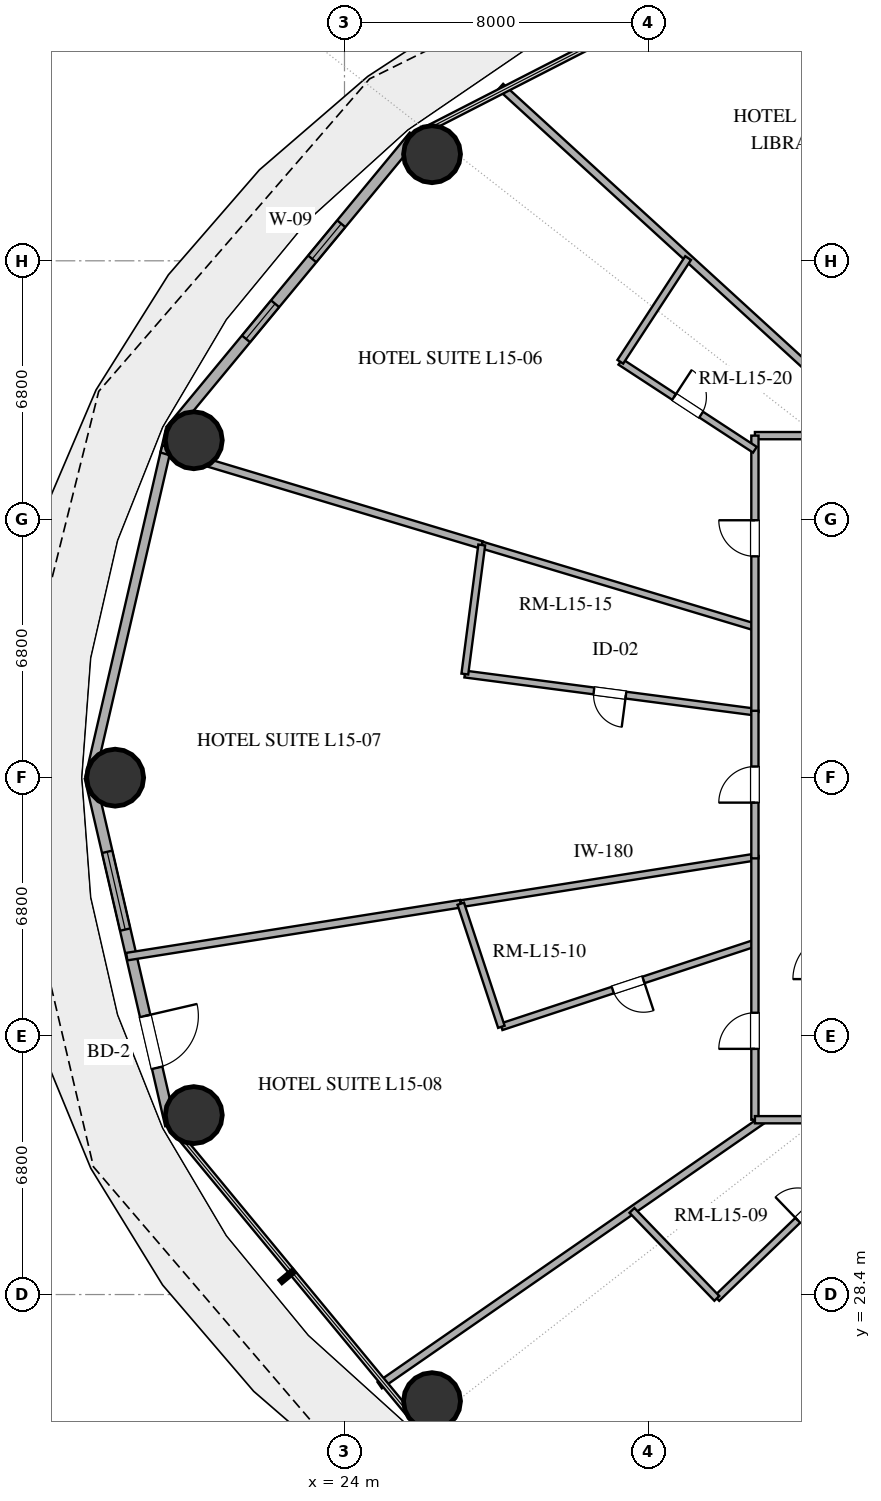
"""IFC4 building model, lengths in metres.
Left out: names, types, materials, properties, quantities, classifications, styles, units other than length and angle.
Written with IfcOpenShell. Run it as: python <this file> out.ifc"""

import sys

from ifc_helpers import new_model, si_unit, direction, frame, frame_2d, origin, origin_2d, place, context, subcontext, project, spatial, rectangle, hollow_circle, extrude, element, fill, save


model = new_model("IFC4")
c1 = context("Model", 3, precision=1e-05, world=origin(), true_north=direction((0.0, 1.0)))
c2 = subcontext(c1, "Body", "Model", "MODEL_VIEW")
j1 = project(units=[si_unit("LENGTHUNIT", "METRE"), si_unit("PLANEANGLEUNIT", "RADIAN")], contexts=[c1])
p1 = place(None, origin())
s1 = spatial("IfcSite", under=j1, at=p1, CompositionType="ELEMENT")
p2 = place(p1, origin())
s2 = spatial("IfcBuilding", under=s1, at=p2, CompositionType="ELEMENT")
p3 = place(p2, frame((0.0, 0.0, 64.2)))
s3 = spatial("IfcBuildingStorey", under=s2, at=p3, CompositionType="ELEMENT", Elevation=64.2)
for number, where, z_axis, x_axis in (
    (1, (26.303, 58.405, 0.0), (0.0, 0.0, 1.0), (1.0, 0.0, 0.0)),
    (2, (20.034, 50.878, 0.0), (0.0, 0.0, 1.0), (1.0, 0.0, 0.0)),
    (3, (17.965, 42.0, 0.0), (0.0, 0.0, 1.0), (1.0, 0.0, 0.0)),
    (4, (20.034, 33.122, 0.0), (0.0, 0.0, 1.0), (1.0, 0.0, 0.0)),
    (5, (26.303, 25.595, 0.0), (0.0, 0.0, 1.0), (1.0, 0.0, 0.0)),
):
    element("IfcColumn", number, at=place(p3, frame(where, z_axis=z_axis, x_axis=x_axis)), inside=s3, PredefinedType="COLUMN", context=c2, shape_type="SweptSolid", body=[
        extrude(hollow_circle(Radius=0.75, WallThickness=0.04, at=origin_2d()), origin(), (0.0, 0.0, 1.0), 3.38),
    ])
p4 = place(p3, frame((25.826, 58.886, 0.0), z_axis=(0.0, 0.0, 1.0), x_axis=(-0.637296809613, -0.770618437657, 0.0)))
e6 = element("IfcWall", 6, at=p4, inside=s3, PredefinedType="SOLIDWALL", context=c2, shape_type="SweptSolid", body=[
    extrude(rectangle(XDim=10.053, YDim=0.28, at=frame_2d((5.027, 0.0))), origin(), (0.0, 0.0, 1.0), 3.38),
])
p5 = place(p4, frame((2.998, 0.0, 0.85)))
e7 = element("IfcOpeningElement", 7, at=p5, cuts=e6, PredefinedType="OPENING", context=c2, shape_type="SweptSolid", body=[
    extrude(rectangle(XDim=1.2, YDim=1.8, at=frame_2d((0.6, 0.9))), frame((0.0, 0.15, 0.0), z_axis=(0.0, -1.0, 0.0), x_axis=(1.0, 0.0, 0.0)), (0.0, 0.0, 1.0), 0.3),
])
p6 = place(p4, frame((5.73, 0.0, 0.85)))
e8 = element("IfcOpeningElement", 8, at=p6, cuts=e6, PredefinedType="OPENING", context=c2, shape_type="SweptSolid", body=[
    extrude(rectangle(XDim=1.2, YDim=1.8, at=frame_2d((0.6, 0.9))), frame((0.0, 0.15, 0.0), z_axis=(0.0, -1.0, 0.0), x_axis=(1.0, 0.0, 0.0)), (0.0, 0.0, 1.0), 0.3),
])
p7 = place(p3, frame((19.419, 51.138, 0.0), z_axis=(0.0, 0.0, 1.0), x_axis=(-0.225454452941, -0.974253709076, 0.0)))
e9 = element("IfcWall", 9, at=p7, inside=s3, PredefinedType="SOLIDWALL", context=c2, shape_type="SweptSolid", body=[
    extrude(rectangle(XDim=9.38, YDim=0.25, at=frame_2d((4.69, 0.0))), origin(), (0.0, 0.0, 1.0), 3.38),
])
p8 = place(p3, frame((17.304, 42.0, 0.0), z_axis=(0.0, 0.0, 1.0), x_axis=(0.225454452941, -0.974253709076, 0.0)))
e10 = element("IfcWall", 10, at=p8, inside=s3, PredefinedType="SOLIDWALL", context=c2, shape_type="SweptSolid", body=[
    extrude(rectangle(XDim=9.38, YDim=0.28, at=frame_2d((4.69, 0.0))), origin(), (0.0, 0.0, 1.0), 3.38),
])
p9 = place(p8, frame((2.002, 0.0, 0.85)))
e11 = element("IfcOpeningElement", 11, at=p9, cuts=e10, PredefinedType="OPENING", context=c2, shape_type="SweptSolid", body=[
    extrude(rectangle(XDim=2.1, YDim=2.2, at=frame_2d((1.05, 1.1))), frame((0.0, 0.15, 0.0), z_axis=(0.0, -1.0, 0.0), x_axis=(1.0, 0.0, 0.0)), (0.0, 0.0, 1.0), 0.3),
])
p10 = place(p8, frame((6.435, 0.0, 0.0)))
e12 = element("IfcOpeningElement", 12, at=p10, cuts=e10, PredefinedType="OPENING", context=c2, shape_type="SweptSolid", body=[
    extrude(rectangle(XDim=1.4, YDim=2.2, at=frame_2d((0.7, 1.1))), frame((0.0, 0.15, 0.0), z_axis=(0.0, -1.0, 0.0), x_axis=(1.0, 0.0, 0.0)), (0.0, 0.0, 1.0), 0.3),
])
p11 = place(p3, frame((25.826, 25.114, 0.0), z_axis=(0.0, 0.0, 1.0), x_axis=(0.889853976658, -0.456245438581, 0.0)))
e13 = element("IfcWall", 13, at=p11, inside=s3, PredefinedType="SOLIDWALL", context=c2, shape_type="SweptSolid", body=[
    extrude(rectangle(XDim=11.346, YDim=0.28, at=frame_2d((5.673, 0.0))), origin(), (0.0, 0.0, 1.0), 3.38),
])
p12 = place(p11, frame((3.267, 0.0, 0.85)))
e14 = element("IfcOpeningElement", 14, at=p12, cuts=e13, PredefinedType="OPENING", context=c2, shape_type="SweptSolid", body=[
    extrude(rectangle(XDim=1.65, YDim=2.0, at=frame_2d((0.825, 1.0))), frame((0.0, 0.15, 0.0), z_axis=(0.0, -1.0, 0.0), x_axis=(1.0, 0.0, 0.0)), (0.0, 0.0, 1.0), 0.3),
])
p13 = place(p11, frame((6.579, 0.0, 0.85)))
e15 = element("IfcOpeningElement", 15, at=p13, cuts=e13, PredefinedType="OPENING", context=c2, shape_type="SweptSolid", body=[
    extrude(rectangle(XDim=1.65, YDim=2.0, at=frame_2d((0.825, 1.0))), frame((0.0, 0.15, 0.0), z_axis=(0.0, -1.0, 0.0), x_axis=(1.0, 0.0, 0.0)), (0.0, 0.0, 1.0), 0.3),
])
p14 = place(p3, frame((42.893, 33.0, 0.0), z_axis=(0.0, 0.0, 1.0), x_axis=(-0.493512300658, -0.869738816599, 0.0)))
e16 = element("IfcWall", 16, at=p14, inside=s3, PredefinedType="PARTITIONING", context=c2, shape_type="SweptSolid", body=[
    extrude(rectangle(XDim=14.938, YDim=0.2, at=frame_2d((7.469, 0.0))), origin(), (0.0, 0.0, 1.0), 2.74),
])
p15 = place(p3, frame((18.271, 37.292, 0.0), z_axis=(0.0, 0.0, 1.0), x_axis=(0.987691229297, 0.156416225401, 0.0)))
e17 = element("IfcWall", 17, at=p15, inside=s3, PredefinedType="PARTITIONING", context=c2, shape_type="SweptSolid", body=[
    extrude(rectangle(XDim=8.898, YDim=0.2, at=frame_2d((4.449, 0.0))), origin(), (0.0, 0.0, 1.0), 2.74),
])
p16 = place(p3, frame((19.184, 50.653, 0.0), z_axis=(0.0, 0.0, 1.0), x_axis=(0.957749889613, -0.287602414708, 0.0)))
e18 = element("IfcWall", 18, at=p16, inside=s3, PredefinedType="PARTITIONING", context=c2, shape_type="SweptSolid", body=[
    extrude(rectangle(XDim=8.8, YDim=0.2, at=frame_2d((4.4, 0.0))), origin(), (0.0, 0.0, 1.0), 2.74),
])
p17 = place(p3, frame((35.009, 33.0, 0.0), z_axis=(0.0, 0.0, 1.0), x_axis=(-0.821999402566, -0.569488351226, 0.0)))
e19 = element("IfcWall", 19, at=p17, inside=s3, PredefinedType="PARTITIONING", context=c2, shape_type="SweptSolid", body=[
    extrude(rectangle(XDim=12.266, YDim=0.2, at=frame_2d((6.133, 0.0))), origin(), (0.0, 0.0, 1.0), 2.74),
])
p18 = place(p3, frame((27.06, 38.683, 0.0), z_axis=(0.0, 0.0, 1.0), x_axis=(0.987690363599, 0.156421691762, 0.0)))
e20 = element("IfcWall", 20, at=p18, inside=s3, PredefinedType="PLUMBINGWALL", context=c2, shape_type="SweptSolid", body=[
    extrude(rectangle(XDim=7.837, YDim=0.18, at=frame_2d((3.918, 0.0))), origin(), (0.0, 0.0, 1.0), 2.74),
])
p19 = place(p3, frame((34.8, 43.728, 0.0), z_axis=(0.0, 0.0, 1.0), x_axis=(-0.991543548491, 0.129774386708, 0.0)))
e21 = element("IfcWall", 21, at=p19, inside=s3, PredefinedType="PLUMBINGWALL", context=c2, shape_type="SweptSolid", body=[
    extrude(rectangle(XDim=7.698, YDim=0.18, at=frame_2d((3.849, 0.0))), origin(), (0.0, 0.0, 1.0), 2.74),
])
p20 = place(p19, frame((3.424, 0.0, 0.0)))
e22 = element("IfcOpeningElement", 22, at=p20, cuts=e21, PredefinedType="OPENING", context=c2, shape_type="SweptSolid", body=[
    extrude(rectangle(XDim=0.85, YDim=2.1, at=frame_2d((0.425, 1.05))), frame((0.0, 0.1, 0.0), z_axis=(0.0, -1.0, 0.0), x_axis=(1.0, 0.0, 0.0)), (0.0, 0.0, 1.0), 0.2),
])
p21 = place(p3, frame((27.612, 48.122, 0.0), z_axis=(0.0, 0.0, 1.0), x_axis=(0.95775642604, -0.28758064674, 0.0)))
e23 = element("IfcWall", 23, at=p21, inside=s3, PredefinedType="PLUMBINGWALL", context=c2, shape_type="SweptSolid", body=[
    extrude(rectangle(XDim=7.506, YDim=0.18, at=frame_2d((3.753, 0.0))), origin(), (0.0, 0.0, 1.0), 2.74),
])
p22 = place(p3, frame((34.8, 37.646, 0.0), z_axis=(0.0, 0.0, 1.0), x_axis=(-0.949662150081, -0.313275917849, 0.0)))
e24 = element("IfcWall", 24, at=p22, inside=s3, PredefinedType="PLUMBINGWALL", context=c2, shape_type="SweptSolid", body=[
    extrude(rectangle(XDim=7.026, YDim=0.18, at=frame_2d((3.513, 0.0))), origin(), (0.0, 0.0, 1.0), 2.74),
])
p23 = place(p22, frame((3.088, 0.0, 0.0)))
e25 = element("IfcOpeningElement", 25, at=p23, cuts=e24, PredefinedType="OPENING", context=c2, shape_type="SweptSolid", body=[
    extrude(rectangle(XDim=0.85, YDim=2.1, at=frame_2d((0.425, 1.05))), frame((0.0, 0.1, 0.0), z_axis=(0.0, -1.0, 0.0), x_axis=(1.0, 0.0, 0.0)), (0.0, 0.0, 1.0), 0.2),
])
p24 = place(p3, frame((38.154, 51.0, 0.0), z_axis=(0.0, 0.0, 1.0), x_axis=(-0.738119160364, 0.674670367738, 0.0)))
e26 = element("IfcWall", 26, at=p24, inside=s3, PredefinedType="PARTITIONING", context=c2, shape_type="SweptSolid", body=[
    extrude(rectangle(XDim=13.61, YDim=0.2, at=frame_2d((6.805, 0.0))), origin(), (0.0, 0.0, 1.0), 2.74),
])
p25 = place(p3, frame((33.798, 28.299, 0.0), z_axis=(0.0, 0.0, 1.0), x_axis=(0.719667322044, 0.69431905172, 0.0)))
e27 = element("IfcWall", 27, at=p25, inside=s3, PredefinedType="PLUMBINGWALL", context=c2, shape_type="SweptSolid", body=[
    extrude(rectangle(XDim=6.771, YDim=0.18, at=frame_2d((3.385, 0.0))), origin(), (0.0, 0.0, 1.0), 2.74),
])
p26 = place(p25, frame((2.96, 0.0, 0.0)))
e28 = element("IfcOpeningElement", 28, at=p26, cuts=e27, PredefinedType="OPENING", context=c2, shape_type="SweptSolid", body=[
    extrude(rectangle(XDim=0.85, YDim=2.1, at=frame_2d((0.425, 1.05))), frame((0.0, 0.1, 0.0), z_axis=(0.0, -1.0, 0.0), x_axis=(1.0, 0.0, 0.0)), (0.0, 0.0, 1.0), 0.2),
])
p27 = place(p3, frame((34.8, 51.0, 0.0), z_axis=(0.0, 0.0, 1.0), x_axis=(1.0, 0.0, 0.0)))
e29 = element("IfcWall", 29, at=p27, inside=s3, PredefinedType="PARTITIONING", context=c2, shape_type="SweptSolid", body=[
    extrude(rectangle(XDim=13.839, YDim=0.19, at=frame_2d((6.919, 0.0))), origin(), (0.0, 0.0, 1.0), 2.74),
])
p28 = place(p27, frame((5.965, 0.0, 0.0)))
e30 = element("IfcOpeningElement", 30, at=p28, cuts=e29, PredefinedType="OPENING", context=c2, shape_type="SweptSolid", body=[
    extrude(rectangle(XDim=1.0, YDim=2.2, at=frame_2d((0.5, 1.1))), frame((0.0, 0.105, 0.0), z_axis=(0.0, -1.0, 0.0), x_axis=(1.0, 0.0, 0.0)), (0.0, 0.0, 1.0), 0.21),
])
p29 = place(p27, frame((10.493, 0.0, 0.0)))
e31 = element("IfcOpeningElement", 31, at=p29, cuts=e29, PredefinedType="OPENING", context=c2, shape_type="SweptSolid", body=[
    extrude(rectangle(XDim=0.95, YDim=2.15, at=frame_2d((0.475, 1.075))), frame((0.0, 0.105, 0.0), z_axis=(0.0, -1.0, 0.0), x_axis=(1.0, 0.0, 0.0)), (0.0, 0.0, 1.0), 0.21),
])
p30 = place(p3, frame((34.8, 43.728, 0.0), z_axis=(0.0, 0.0, 1.0), x_axis=(0.0, 1.0, 0.0)))
e32 = element("IfcWall", 32, at=p30, inside=s3, PredefinedType="PARTITIONING", context=c2, shape_type="SweptSolid", body=[
    extrude(rectangle(XDim=7.272, YDim=0.19, at=frame_2d((3.636, 0.0))), origin(), (0.0, 0.0, 1.0), 2.74),
])
p31 = place(p30, frame((4.096, 0.0, 0.0)))
e33 = element("IfcOpeningElement", 33, at=p31, cuts=e32, PredefinedType="OPENING", context=c2, shape_type="SweptSolid", body=[
    extrude(rectangle(XDim=0.95, YDim=2.15, at=frame_2d((0.475, 1.075))), frame((0.0, 0.105, 0.0), z_axis=(0.0, -1.0, 0.0), x_axis=(1.0, 0.0, 0.0)), (0.0, 0.0, 1.0), 0.21),
])
p32 = place(p3, frame((34.8, 33.0, 0.0), z_axis=(0.0, 0.0, 1.0), x_axis=(0.0, 1.0, 0.0)))
e34 = element("IfcWall", 34, at=p32, inside=s3, PredefinedType="PARTITIONING", context=c2, shape_type="SweptSolid", body=[
    extrude(rectangle(XDim=6.942, YDim=0.19, at=frame_2d((3.471, 0.0))), origin(), (0.0, 0.0, 1.0), 2.74),
])
p33 = place(p32, frame((1.865, 0.0, 0.0)))
e35 = element("IfcOpeningElement", 35, at=p33, cuts=e34, PredefinedType="OPENING", context=c2, shape_type="SweptSolid", body=[
    extrude(rectangle(XDim=0.95, YDim=2.15, at=frame_2d((0.475, 1.075))), frame((0.0, 0.105, 0.0), z_axis=(0.0, -1.0, 0.0), x_axis=(1.0, 0.0, 0.0)), (0.0, 0.0, 1.0), 0.21),
])
p34 = place(p3, frame((47.425, 33.0, 0.0), z_axis=(0.0, 0.0, 1.0), x_axis=(-1.0, 0.0, 0.0)))
e36 = element("IfcWall", 36, at=p34, inside=s3, PredefinedType="PARTITIONING", context=c2, shape_type="SweptSolid", body=[
    extrude(rectangle(XDim=12.625, YDim=0.19, at=frame_2d((6.312, 0.0))), origin(), (0.0, 0.0, 1.0), 2.74),
])
p35 = place(p34, frame((1.784, 0.0, 0.0)))
e37 = element("IfcOpeningElement", 37, at=p35, cuts=e36, PredefinedType="OPENING", context=c2, shape_type="SweptSolid", body=[
    extrude(rectangle(XDim=1.0, YDim=2.2, at=frame_2d((0.5, 1.1))), frame((0.0, 0.105, 0.0), z_axis=(0.0, -1.0, 0.0), x_axis=(1.0, 0.0, 0.0)), (0.0, 0.0, 1.0), 0.21),
])
p36 = place(p34, frame((6.173, 0.0, 0.0)))
e38 = element("IfcOpeningElement", 38, at=p36, cuts=e36, PredefinedType="OPENING", context=c2, shape_type="SweptSolid", body=[
    extrude(rectangle(XDim=0.95, YDim=2.15, at=frame_2d((0.475, 1.075))), frame((0.0, 0.105, 0.0), z_axis=(0.0, -1.0, 0.0), x_axis=(1.0, 0.0, 0.0)), (0.0, 0.0, 1.0), 0.21),
])
p37 = place(p3, frame((31.258, 52.944, 0.0), z_axis=(0.0, 0.0, 1.0), x_axis=(0.837031612028, -0.5471545307, 0.0)))
e39 = element("IfcWall", 39, at=p37, inside=s3, PredefinedType="PLUMBINGWALL", context=c2, shape_type="SweptSolid", body=[
    extrude(rectangle(XDim=4.231, YDim=0.18, at=frame_2d((2.116, 0.0))), origin(), (0.0, 0.0, 1.0), 2.74),
])
p38 = place(p37, frame((1.691, 0.0, 0.0)))
e40 = element("IfcOpeningElement", 40, at=p38, cuts=e39, PredefinedType="OPENING", context=c2, shape_type="SweptSolid", body=[
    extrude(rectangle(XDim=0.85, YDim=2.1, at=frame_2d((0.425, 1.05))), frame((0.0, 0.1, 0.0), z_axis=(0.0, -1.0, 0.0), x_axis=(1.0, 0.0, 0.0)), (0.0, 0.0, 1.0), 0.2),
])
p39 = place(p3, frame((34.8, 39.877, 0.0), z_axis=(0.0, 0.0, 1.0), x_axis=(0.0, 1.0, 0.0)))
e41 = element("IfcWall", 41, at=p39, inside=s3, PredefinedType="PARTITIONING", context=c2, shape_type="SweptSolid", body=[
    extrude(rectangle(XDim=3.883, YDim=0.19, at=frame_2d((1.941, 0.0))), origin(), (0.0, 0.0, 1.0), 2.74),
])
p40 = place(p39, frame((1.467, 0.0, 0.0)))
e42 = element("IfcOpeningElement", 42, at=p40, cuts=e41, PredefinedType="OPENING", context=c2, shape_type="SweptSolid", body=[
    extrude(rectangle(XDim=0.95, YDim=2.15, at=frame_2d((0.475, 1.075))), frame((0.0, 0.105, 0.0), z_axis=(0.0, -1.0, 0.0), x_axis=(1.0, 0.0, 0.0)), (0.0, 0.0, 1.0), 0.21),
])
p41 = place(p3, frame((27.167, 44.727, 0.0), z_axis=(0.0, 0.0, 1.0), x_axis=(0.129823772588, 0.991537083558, 0.0)))
e43 = element("IfcWall", 43, at=p41, inside=s3, PredefinedType="PLUMBINGWALL", context=c2, shape_type="SweptSolid", body=[
    extrude(rectangle(XDim=3.425, YDim=0.18, at=frame_2d((1.712, 0.0))), origin(), (0.0, 0.0, 1.0), 2.74),
])
p42 = place(p3, frame((28.128, 35.445, 0.0), z_axis=(0.0, 0.0, 1.0), x_axis=(-0.313262541659, 0.949666562533, 0.0)))
e44 = element("IfcWall", 44, at=p42, inside=s3, PredefinedType="PLUMBINGWALL", context=c2, shape_type="SweptSolid", body=[
    extrude(rectangle(XDim=3.41, YDim=0.18, at=frame_2d((1.705, 0.0))), origin(), (0.0, 0.0, 1.0), 2.74),
])
p43 = place(p3, frame((33.042, 55.672, 0.0), z_axis=(0.0, 0.0, 1.0), x_axis=(-0.547176717469, -0.837017108463, 0.0)))
e45 = element("IfcWall", 45, at=p43, inside=s3, PredefinedType="PLUMBINGWALL", context=c2, shape_type="SweptSolid", body=[
    extrude(rectangle(XDim=3.26, YDim=0.18, at=frame_2d((1.63, 0.0))), origin(), (0.0, 0.0, 1.0), 2.74),
])
p44 = place(p3, frame((31.565, 30.614, 0.0), z_axis=(0.0, 0.0, 1.0), x_axis=(0.694278833189, -0.719706121821, 0.0)))
e46 = element("IfcWall", 46, at=p44, inside=s3, PredefinedType="PLUMBINGWALL", context=c2, shape_type="SweptSolid", body=[
    extrude(rectangle(XDim=3.217, YDim=0.18, at=frame_2d((1.608, 0.0))), origin(), (0.0, 0.0, 1.0), 2.74),
])
p45 = place(p5, origin())
e47 = element("IfcWindow", 47, at=p45, inside=s3, PartitioningType="SINGLE_PANEL", PredefinedType="WINDOW", context=c2, shape_type="SweptSolid", body=[
    extrude(rectangle(XDim=1.2, YDim=1.8, at=frame_2d((0.6, 0.9))), frame((0.0, 0.03, 0.0), z_axis=(0.0, -1.0, 0.0), x_axis=(1.0, 0.0, 0.0)), (0.0, 0.0, 1.0), 0.06),
])
fill(e7, e47)
p46 = place(p6, origin())
e48 = element("IfcWindow", 48, at=p46, inside=s3, PartitioningType="SINGLE_PANEL", PredefinedType="WINDOW", context=c2, shape_type="SweptSolid", body=[
    extrude(rectangle(XDim=1.2, YDim=1.8, at=frame_2d((0.6, 0.9))), frame((0.0, 0.03, 0.0), z_axis=(0.0, -1.0, 0.0), x_axis=(1.0, 0.0, 0.0)), (0.0, 0.0, 1.0), 0.06),
])
fill(e8, e48)
p47 = place(p9, origin())
e49 = element("IfcWindow", 49, at=p47, inside=s3, PartitioningType="SINGLE_PANEL", PredefinedType="WINDOW", context=c2, shape_type="SweptSolid", body=[
    extrude(rectangle(XDim=2.1, YDim=2.2, at=frame_2d((1.05, 1.1))), frame((0.0, 0.03, 0.0), z_axis=(0.0, -1.0, 0.0), x_axis=(1.0, 0.0, 0.0)), (0.0, 0.0, 1.0), 0.06),
])
fill(e11, e49)
p48 = place(p10, origin())
e50 = element("IfcDoor", 50, at=p48, inside=s3, OperationType="SINGLE_SWING_LEFT", PredefinedType="DOOR", context=c2, shape_type="SweptSolid", body=[
    extrude(rectangle(XDim=1.4, YDim=2.2, at=frame_2d((0.7, 1.1))), frame((0.0, 0.025, 0.0), z_axis=(0.0, -1.0, 0.0), x_axis=(1.0, 0.0, 0.0)), (0.0, 0.0, 1.0), 0.05),
])
fill(e12, e50)
p49 = place(p20, origin())
e51 = element("IfcDoor", 51, at=p49, inside=s3, OperationType="SINGLE_SWING_LEFT", PredefinedType="DOOR", context=c2, shape_type="SweptSolid", body=[
    extrude(rectangle(XDim=0.85, YDim=2.1, at=frame_2d((0.425, 1.05))), frame((0.0, 0.025, 0.0), z_axis=(0.0, -1.0, 0.0), x_axis=(1.0, 0.0, 0.0)), (0.0, 0.0, 1.0), 0.05),
])
fill(e22, e51)
p50 = place(p23, origin())
e52 = element("IfcDoor", 52, at=p50, inside=s3, OperationType="SINGLE_SWING_LEFT", PredefinedType="DOOR", context=c2, shape_type="SweptSolid", body=[
    extrude(rectangle(XDim=0.85, YDim=2.1, at=frame_2d((0.425, 1.05))), frame((0.0, 0.025, 0.0), z_axis=(0.0, -1.0, 0.0), x_axis=(1.0, 0.0, 0.0)), (0.0, 0.0, 1.0), 0.05),
])
fill(e25, e52)
p51 = place(p26, origin())
e53 = element("IfcDoor", 53, at=p51, inside=s3, OperationType="SINGLE_SWING_LEFT", PredefinedType="DOOR", context=c2, shape_type="SweptSolid", body=[
    extrude(rectangle(XDim=0.85, YDim=2.1, at=frame_2d((0.425, 1.05))), frame((0.0, 0.025, 0.0), z_axis=(0.0, -1.0, 0.0), x_axis=(1.0, 0.0, 0.0)), (0.0, 0.0, 1.0), 0.05),
])
fill(e28, e53)
p52 = place(p31, origin())
e54 = element("IfcDoor", 54, at=p52, inside=s3, OperationType="SINGLE_SWING_RIGHT", PredefinedType="DOOR", context=c2, shape_type="SweptSolid", body=[
    extrude(rectangle(XDim=0.95, YDim=2.15, at=frame_2d((0.475, 1.075))), frame((0.0, 0.025, 0.0), z_axis=(0.0, -1.0, 0.0), x_axis=(1.0, 0.0, 0.0)), (0.0, 0.0, 1.0), 0.05),
])
fill(e33, e54)
p53 = place(p33, origin())
e55 = element("IfcDoor", 55, at=p53, inside=s3, OperationType="SINGLE_SWING_LEFT", PredefinedType="DOOR", context=c2, shape_type="SweptSolid", body=[
    extrude(rectangle(XDim=0.95, YDim=2.15, at=frame_2d((0.475, 1.075))), frame((0.0, 0.025, 0.0), z_axis=(0.0, -1.0, 0.0), x_axis=(1.0, 0.0, 0.0)), (0.0, 0.0, 1.0), 0.05),
])
fill(e35, e55)
p54 = place(p38, origin())
e56 = element("IfcDoor", 56, at=p54, inside=s3, OperationType="SINGLE_SWING_LEFT", PredefinedType="DOOR", context=c2, shape_type="SweptSolid", body=[
    extrude(rectangle(XDim=0.85, YDim=2.1, at=frame_2d((0.425, 1.05))), frame((0.0, 0.025, 0.0), z_axis=(0.0, -1.0, 0.0), x_axis=(1.0, 0.0, 0.0)), (0.0, 0.0, 1.0), 0.05),
])
fill(e40, e56)
p55 = place(p40, origin())
e57 = element("IfcDoor", 57, at=p55, inside=s3, OperationType="SINGLE_SWING_LEFT", PredefinedType="DOOR", context=c2, shape_type="SweptSolid", body=[
    extrude(rectangle(XDim=0.95, YDim=2.15, at=frame_2d((0.475, 1.075))), frame((0.0, 0.025, 0.0), z_axis=(0.0, -1.0, 0.0), x_axis=(1.0, 0.0, 0.0)), (0.0, 0.0, 1.0), 0.05),
])
fill(e42, e57)
save(model, sys.argv[1])
